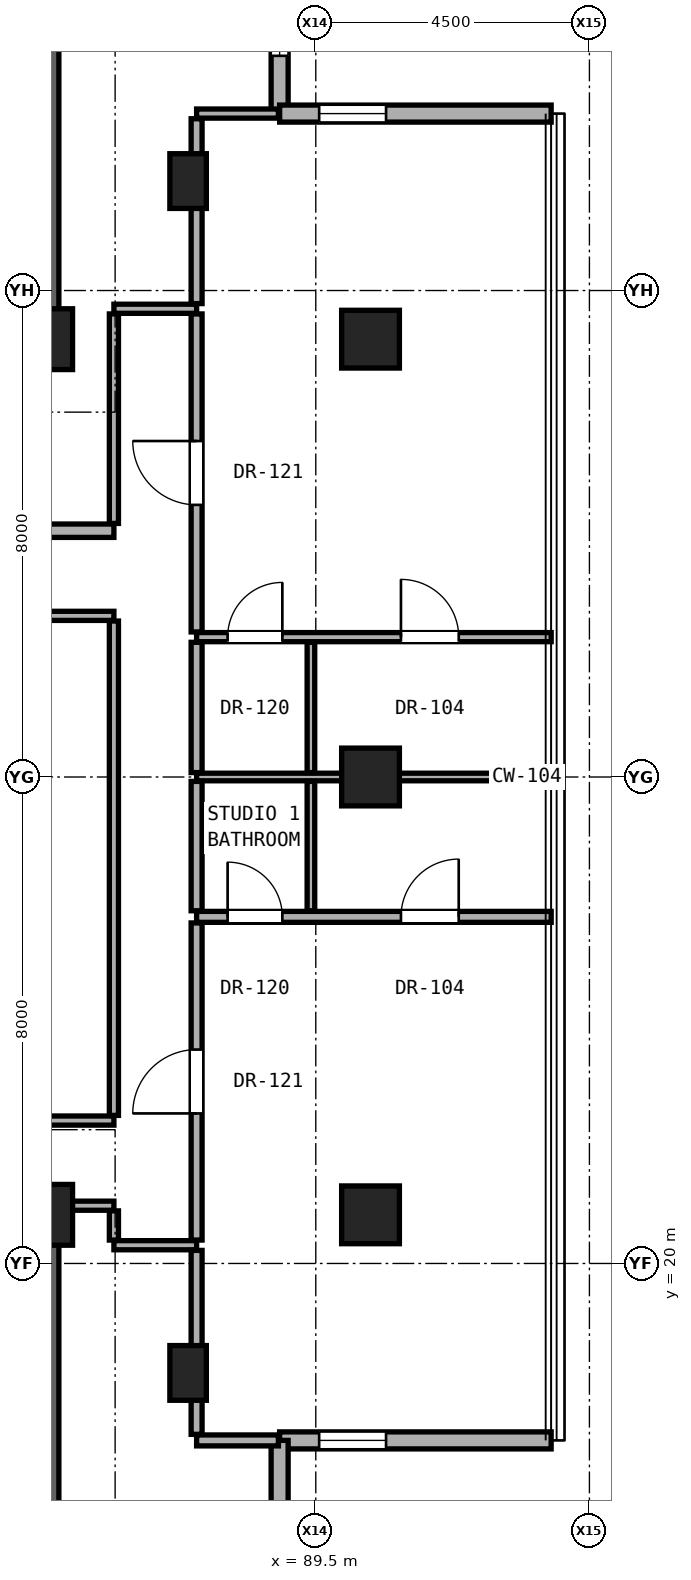
"""IFC4 building model, lengths in metres.
Left out: names, types, materials, properties, quantities, classifications, styles, units other than length and angle.
Written with IfcOpenShell. Run it as: python <this file> out.ifc"""

import sys

from ifc_helpers import new_model, si_unit, direction, frame, frame_2d, origin, origin_2d, place, context, subcontext, project, spatial, rectangle, hollow_rectangle, extrude, element, fill, save


model = new_model("IFC4")
c1 = context("Model", 3, precision=1e-05, world=origin(), true_north=direction((0.0, 1.0)))
c2 = subcontext(c1, "Body", "Model", "MODEL_VIEW")
j1 = project(units=[si_unit("LENGTHUNIT", "METRE"), si_unit("PLANEANGLEUNIT", "RADIAN")], contexts=[c1])
p1 = place(None, origin())
s1 = spatial("IfcSite", under=j1, at=p1, CompositionType="ELEMENT")
p2 = place(p1, origin())
s2 = spatial("IfcBuilding", under=s1, at=p2, CompositionType="ELEMENT")
p3 = place(p2, frame((0.0, 0.0, 157.65)))
s3 = spatial("IfcBuildingStorey", under=s2, at=p3, CompositionType="ELEMENT", Elevation=157.65)
for number, where, z_axis, x_axis in (
    (1, (85.0, 20.8, 0.0), (0.0, 0.0, 1.0), (1.0, 0.0, 0.0)),
    (2, (85.0, 35.2, 0.0), (0.0, 0.0, 1.0), (1.0, 0.0, 0.0)),
):
    element("IfcColumn", number, at=place(p3, frame(where, z_axis=z_axis, x_axis=x_axis)), inside=s3, PredefinedType="COLUMN", context=c2, shape_type="SweptSolid", body=[
        extrude(rectangle(XDim=1.0, YDim=1.0, at=origin_2d()), origin(), (0.0, 0.0, 1.0), 3.25),
    ])
for number, where, z_axis, x_axis in (
    (3, (90.4, 20.8, 0.0), (0.0, 0.0, 1.0), (1.0, 0.0, 0.0)),
    (4, (90.4, 28.0, 0.0), (0.0, 0.0, 1.0), (1.0, 0.0, 0.0)),
    (5, (90.4, 35.2, 0.0), (0.0, 0.0, 1.0), (1.0, 0.0, 0.0)),
):
    element("IfcColumn", number, at=place(p3, frame(where, z_axis=z_axis, x_axis=x_axis)), inside=s3, PredefinedType="COLUMN", context=c2, shape_type="SweptSolid", body=[
        extrude(hollow_rectangle(XDim=0.95, YDim=0.95, WallThickness=0.05, at=origin_2d()), origin(), (0.0, 0.0, 1.0), 3.25),
    ])
for number, where, z_axis, x_axis in (
    (6, (87.4, 18.2, 0.0), (0.0, 0.0, 1.0), (1.0, 0.0, 0.0)),
    (7, (87.4, 37.8, 0.0), (0.0, 0.0, 1.0), (1.0, 0.0, 0.0)),
):
    element("IfcColumn", number, at=place(p3, frame(where, z_axis=z_axis, x_axis=x_axis)), inside=s3, PredefinedType="PILASTER", context=c2, shape_type="SweptSolid", body=[
        extrude(rectangle(XDim=0.6, YDim=0.9, at=origin_2d()), origin(), (0.0, 0.0, 1.0), 3.25),
    ])
for number, where, z_axis, x_axis in (
    (8, (85.0, 35.2, 0.0), (0.0, 0.0, 1.0), (0.0, 1.0, 0.0)),
    (9, (85.0, 15.2, 0.0), (0.0, 0.0, 1.0), (0.0, 1.0, 0.0)),
):
    element("IfcWall", number, at=place(p3, frame(where, z_axis=z_axis, x_axis=x_axis)), inside=s3, PredefinedType="SHEAR", context=c2, shape_type="SweptSolid", body=[
        extrude(rectangle(XDim=5.6, YDim=0.55, at=frame_2d((2.8, 0.0))), origin(), (0.0, 0.0, 1.0), 3.05),
    ])
p4 = place(p3, frame((88.905, 38.91, 0.0), z_axis=(0.0, 0.0, 1.0), x_axis=(0.0, 1.0, 0.0)))
e10 = element("IfcWall", 10, at=p4, inside=s3, PredefinedType="SOLIDWALL", context=c2, shape_type="SweptSolid", body=[
    extrude(rectangle(XDim=4.465, YDim=0.28, at=frame_2d((2.232, 0.0))), origin(), (0.0, 0.0, 1.0), 3.03),
])
p5 = place(p4, frame((0.95, 0.0, 0.85)))
e11 = element("IfcOpeningElement", 11, at=p5, cuts=e10, PredefinedType="OPENING", context=c2, shape_type="SweptSolid", body=[
    extrude(rectangle(XDim=1.1, YDim=2.0, at=frame_2d((0.55, 1.0))), frame((0.0, 0.15, 0.0), z_axis=(0.0, -1.0, 0.0), x_axis=(1.0, 0.0, 0.0)), (0.0, 0.0, 1.0), 0.3),
])
p6 = place(p3, frame((88.905, 17.09, 0.0), z_axis=(0.0, 0.0, 1.0), x_axis=(1.0, 0.0, 0.0)))
e12 = element("IfcWall", 12, at=p6, inside=s3, PredefinedType="SOLIDWALL", context=c2, shape_type="SweptSolid", body=[
    extrude(rectangle(XDim=4.465, YDim=0.28, at=frame_2d((2.233, 0.0))), origin(), (0.0, 0.0, 1.0), 3.03),
])
p7 = place(p6, frame((0.65, 0.0, 0.85)))
e13 = element("IfcOpeningElement", 13, at=p7, cuts=e12, PredefinedType="OPENING", context=c2, shape_type="SweptSolid", body=[
    extrude(rectangle(XDim=1.1, YDim=2.0, at=frame_2d((0.55, 1.0))), frame((0.0, 0.15, 0.0), z_axis=(0.0, -1.0, 0.0), x_axis=(1.0, 0.0, 0.0)), (0.0, 0.0, 1.0), 0.3),
])
p8 = place(p3, frame((88.905, 12.625, 0.0), z_axis=(0.0, 0.0, 1.0), x_axis=(0.0, 1.0, 0.0)))
e14 = element("IfcWall", 14, at=p8, inside=s3, PredefinedType="SOLIDWALL", context=c2, shape_type="SweptSolid", body=[
    extrude(rectangle(XDim=4.465, YDim=0.28, at=frame_2d((2.232, 0.0))), origin(), (0.0, 0.0, 1.0), 3.03),
])
p9 = place(p3, frame((93.371, 38.91, 0.0), z_axis=(0.0, 0.0, 1.0), x_axis=(-1.0, 0.0, 0.0)))
e15 = element("IfcWall", 15, at=p9, inside=s3, PredefinedType="SOLIDWALL", context=c2, shape_type="SweptSolid", body=[
    extrude(rectangle(XDim=4.465, YDim=0.28, at=frame_2d((2.233, 0.0))), origin(), (0.0, 0.0, 1.0), 3.03),
])
p10 = place(p9, frame((2.715, 0.0, 0.85)))
e16 = element("IfcOpeningElement", 16, at=p10, cuts=e15, PredefinedType="OPENING", context=c2, shape_type="SweptSolid", body=[
    extrude(rectangle(XDim=1.1, YDim=2.0, at=frame_2d((0.55, 1.0))), frame((0.0, 0.15, 0.0), z_axis=(0.0, -1.0, 0.0), x_axis=(1.0, 0.0, 0.0)), (0.0, 0.0, 1.0), 0.3),
])
p11 = place(p3, frame((87.54, 17.09, 0.0), z_axis=(0.0, 0.0, 1.0), x_axis=(1.0, 0.0, 0.0)))
e17 = element("IfcWall", 17, at=p11, inside=s3, PredefinedType="PARTITIONING", context=c2, shape_type="SweptSolid", body=[
    extrude(rectangle(XDim=1.345, YDim=0.18, at=frame_2d((0.673, 0.0))), origin(), (0.0, 0.0, 1.0), 3.05),
])
p12 = place(p3, frame((86.18, 20.3, 0.0), z_axis=(0.0, 0.0, 1.0), x_axis=(1.0, 0.0, 0.0)))
e18 = element("IfcWall", 18, at=p12, inside=s3, PredefinedType="PARTITIONING", context=c2, shape_type="SweptSolid", body=[
    extrude(rectangle(XDim=1.36, YDim=0.15, at=frame_2d((0.68, 0.0))), origin(), (0.0, 0.0, 1.0), 3.05),
])
p13 = place(p3, frame((85.27, 20.95, 0.0), z_axis=(0.0, 0.0, 1.0), x_axis=(1.0, 0.0, 0.0)))
e19 = element("IfcWall", 19, at=p13, inside=s3, PredefinedType="PARTITIONING", context=c2, shape_type="SweptSolid", body=[
    extrude(rectangle(XDim=0.91, YDim=0.15, at=frame_2d((0.455, 0.0))), origin(), (0.0, 0.0, 1.0), 2.442),
])
p14 = place(p3, frame((66.68, 22.35, 0.0), z_axis=(0.0, 0.0, 1.0), x_axis=(1.0, 0.0, 0.0)))
e20 = element("IfcWall", 20, at=p14, inside=s3, PredefinedType="PARTITIONING", context=c2, shape_type="SweptSolid", body=[
    extrude(rectangle(XDim=19.5, YDim=0.15, at=frame_2d((9.75, 0.0))), origin(), (0.0, 0.0, 1.0), 2.186),
])
p15 = place(p14, frame((8.053, 0.0, 0.0)))
e21 = element("IfcOpeningElement", 21, at=p15, cuts=e20, PredefinedType="OPENING", context=c2, shape_type="SweptSolid", body=[
    extrude(rectangle(XDim=0.85, YDim=2.01, at=frame_2d((0.425, 1.005))), frame((0.0, 0.085, 0.0), z_axis=(0.0, -1.0, 0.0), x_axis=(1.0, 0.0, 0.0)), (0.0, 0.0, 1.0), 0.17),
])
p16 = place(p3, frame((87.54, 25.7, 0.0), z_axis=(0.0, 0.0, 1.0), x_axis=(1.0, 0.0, 0.0)))
e22 = element("IfcWall", 22, at=p16, inside=s3, PredefinedType="PARTITIONING", context=c2, shape_type="SweptSolid", body=[
    extrude(rectangle(XDim=5.831, YDim=0.18, at=frame_2d((2.916, 0.0))), origin(), (0.0, 0.0, 1.0), 2.269),
])
p17 = place(p16, frame((3.361, 0.0, 0.0)))
e23 = element("IfcOpeningElement", 23, at=p17, cuts=e22, PredefinedType="OPENING", context=c2, shape_type="SweptSolid", body=[
    extrude(rectangle(XDim=0.95, YDim=2.15, at=frame_2d((0.475, 1.075))), frame((0.0, 0.1, 0.0), z_axis=(0.0, -1.0, 0.0), x_axis=(1.0, 0.0, 0.0)), (0.0, 0.0, 1.0), 0.2),
])
p18 = place(p16, frame((0.51, 0.0, 0.0)))
e24 = element("IfcOpeningElement", 24, at=p18, cuts=e22, PredefinedType="OPENING", context=c2, shape_type="SweptSolid", body=[
    extrude(rectangle(XDim=0.9, YDim=2.1, at=frame_2d((0.45, 1.05))), frame((0.0, 0.1, 0.0), z_axis=(0.0, -1.0, 0.0), x_axis=(1.0, 0.0, 0.0)), (0.0, 0.0, 1.0), 0.2),
])
p19 = place(p3, frame((87.54, 28.0, 0.0), z_axis=(0.0, 0.0, 1.0), x_axis=(1.0, 0.0, 0.0)))
e25 = element("IfcWall", 25, at=p19, inside=s3, PredefinedType="PARTITIONING", context=c2, shape_type="SweptSolid", body=[
    extrude(rectangle(XDim=5.831, YDim=0.125, at=frame_2d((2.916, 0.0))), origin(), (0.0, 0.0, 1.0), 2.269),
])
p20 = place(p3, frame((87.54, 30.3, 0.0), z_axis=(0.0, 0.0, 1.0), x_axis=(1.0, 0.0, 0.0)))
e26 = element("IfcWall", 26, at=p20, inside=s3, PredefinedType="PARTITIONING", context=c2, shape_type="SweptSolid", body=[
    extrude(rectangle(XDim=5.831, YDim=0.15, at=frame_2d((2.916, 0.0))), origin(), (0.0, 0.0, 1.0), 2.269),
])
p21 = place(p20, frame((3.361, 0.0, 0.0)))
e27 = element("IfcOpeningElement", 27, at=p21, cuts=e26, PredefinedType="OPENING", context=c2, shape_type="SweptSolid", body=[
    extrude(rectangle(XDim=0.95, YDim=2.15, at=frame_2d((0.475, 1.075))), frame((0.0, 0.085, 0.0), z_axis=(0.0, -1.0, 0.0), x_axis=(1.0, 0.0, 0.0)), (0.0, 0.0, 1.0), 0.17),
])
p22 = place(p20, frame((0.51, 0.0, 0.0)))
e28 = element("IfcOpeningElement", 28, at=p22, cuts=e26, PredefinedType="OPENING", context=c2, shape_type="SweptSolid", body=[
    extrude(rectangle(XDim=0.9, YDim=2.1, at=frame_2d((0.45, 1.05))), frame((0.0, 0.085, 0.0), z_axis=(0.0, -1.0, 0.0), x_axis=(1.0, 0.0, 0.0)), (0.0, 0.0, 1.0), 0.17),
])
p23 = place(p3, frame((66.68, 30.65, 0.0), z_axis=(0.0, 0.0, 1.0), x_axis=(1.0, 0.0, 0.0)))
e29 = element("IfcWall", 29, at=p23, inside=s3, PredefinedType="PARTITIONING", context=c2, shape_type="SweptSolid", body=[
    extrude(rectangle(XDim=19.5, YDim=0.15, at=frame_2d((9.75, 0.0))), origin(), (0.0, 0.0, 1.0), 2.186),
])
p24 = place(p23, frame((3.745, 0.0, 0.0)))
e30 = element("IfcOpeningElement", 30, at=p24, cuts=e29, PredefinedType="OPENING", context=c2, shape_type="SweptSolid", body=[
    extrude(rectangle(XDim=0.95, YDim=2.15, at=frame_2d((0.475, 1.075))), frame((0.0, 0.085, 0.0), z_axis=(0.0, -1.0, 0.0), x_axis=(1.0, 0.0, 0.0)), (0.0, 0.0, 1.0), 0.17),
])
p25 = place(p23, frame((15.098, 0.0, 0.0)))
e31 = element("IfcOpeningElement", 31, at=p25, cuts=e29, PredefinedType="OPENING", context=c2, shape_type="SweptSolid", body=[
    extrude(rectangle(XDim=0.85, YDim=2.01, at=frame_2d((0.425, 1.005))), frame((0.0, 0.085, 0.0), z_axis=(0.0, -1.0, 0.0), x_axis=(1.0, 0.0, 0.0)), (0.0, 0.0, 1.0), 0.17),
])
p26 = place(p3, frame((71.55, 32.05, 0.0), z_axis=(0.0, 0.0, 1.0), x_axis=(1.0, 0.0, 0.0)))
e32 = element("IfcWall", 32, at=p26, inside=s3, PredefinedType="SOLIDWALL", context=c2, shape_type="SweptSolid", body=[
    extrude(rectangle(XDim=14.63, YDim=0.22, at=frame_2d((7.315, 0.0))), origin(), (0.0, 0.0, 1.0), 2.186),
])
p27 = place(p26, frame((6.065, 0.0, 0.0)))
e33 = element("IfcOpeningElement", 33, at=p27, cuts=e32, PredefinedType="OPENING", context=c2, shape_type="SweptSolid", body=[
    extrude(rectangle(XDim=0.85, YDim=2.01, at=frame_2d((0.425, 1.005))), frame((0.0, 0.12, 0.0), z_axis=(0.0, -1.0, 0.0), x_axis=(1.0, 0.0, 0.0)), (0.0, 0.0, 1.0), 0.24),
])
p28 = place(p26, frame((10.535, 0.0, 0.0)))
e34 = element("IfcOpeningElement", 34, at=p28, cuts=e32, PredefinedType="OPENING", context=c2, shape_type="SweptSolid", body=[
    extrude(rectangle(XDim=0.95, YDim=2.15, at=frame_2d((0.475, 1.075))), frame((0.0, 0.12, 0.0), z_axis=(0.0, -1.0, 0.0), x_axis=(1.0, 0.0, 0.0)), (0.0, 0.0, 1.0), 0.24),
])
p29 = place(p26, frame((0.7, 0.0, 0.0)))
e35 = element("IfcOpeningElement", 35, at=p29, cuts=e32, PredefinedType="OPENING", context=c2, shape_type="SweptSolid", body=[
    extrude(rectangle(XDim=0.85, YDim=2.01, at=frame_2d((0.425, 1.005))), frame((0.0, 0.12, 0.0), z_axis=(0.0, -1.0, 0.0), x_axis=(1.0, 0.0, 0.0)), (0.0, 0.0, 1.0), 0.24),
])
p30 = place(p26, frame((2.55, 0.0, 0.0)))
e36 = element("IfcOpeningElement", 36, at=p30, cuts=e32, PredefinedType="OPENING", context=c2, shape_type="SweptSolid", body=[
    extrude(rectangle(XDim=0.85, YDim=2.01, at=frame_2d((0.425, 1.005))), frame((0.0, 0.12, 0.0), z_axis=(0.0, -1.0, 0.0), x_axis=(1.0, 0.0, 0.0)), (0.0, 0.0, 1.0), 0.24),
])
p31 = place(p3, frame((86.18, 35.7, 0.0), z_axis=(0.0, 0.0, 1.0), x_axis=(1.0, 0.0, 0.0)))
e37 = element("IfcWall", 37, at=p31, inside=s3, PredefinedType="PARTITIONING", context=c2, shape_type="SweptSolid", body=[
    extrude(rectangle(XDim=1.36, YDim=0.15, at=frame_2d((0.68, 0.0))), origin(), (0.0, 0.0, 1.0), 3.05),
])
p32 = place(p3, frame((87.54, 38.91, 0.0), z_axis=(0.0, 0.0, 1.0), x_axis=(1.0, 0.0, 0.0)))
e38 = element("IfcWall", 38, at=p32, inside=s3, PredefinedType="PARTITIONING", context=c2, shape_type="SweptSolid", body=[
    extrude(rectangle(XDim=1.345, YDim=0.15, at=frame_2d((0.673, 0.0))), origin(), (0.0, 0.0, 1.0), 3.05),
])
p33 = place(p3, frame((86.18, 20.385, 0.0), z_axis=(0.0, 0.0, 1.0), x_axis=(0.0, 1.0, 0.0)))
e39 = element("IfcWall", 39, at=p33, inside=s3, PredefinedType="PARTITIONING", context=c2, shape_type="SweptSolid", body=[
    extrude(rectangle(XDim=0.48, YDim=0.15, at=frame_2d((0.24, 0.0))), origin(), (0.0, 0.0, 1.0), 2.442),
])
p34 = place(p3, frame((86.18, 22.435, 0.0), z_axis=(0.0, 0.0, 1.0), x_axis=(0.0, 1.0, 0.0)))
e40 = element("IfcWall", 40, at=p34, inside=s3, PredefinedType="PARTITIONING", context=c2, shape_type="SweptSolid", body=[
    extrude(rectangle(XDim=8.13, YDim=0.15, at=frame_2d((4.065, 0.0))), origin(), (0.0, 0.0, 1.0), 2.346),
])
p35 = place(p3, frame((86.18, 32.17, 0.0), z_axis=(0.0, 0.0, 1.0), x_axis=(0.0, 1.0, 0.0)))
e41 = element("IfcWall", 41, at=p35, inside=s3, PredefinedType="PARTITIONING", context=c2, shape_type="SweptSolid", body=[
    extrude(rectangle(XDim=3.445, YDim=0.15, at=frame_2d((1.723, 0.0))), origin(), (0.0, 0.0, 1.0), 2.442),
])
p36 = place(p3, frame((87.54, 17.19, 0.0), z_axis=(0.0, 0.0, 1.0), x_axis=(0.0, 1.0, 0.0)))
e42 = element("IfcWall", 42, at=p36, inside=s3, PredefinedType="PARTITIONING", context=c2, shape_type="SweptSolid", body=[
    extrude(rectangle(XDim=3.025, YDim=0.18, at=frame_2d((1.513, 0.0))), origin(), (0.0, 0.0, 1.0), 2.493),
])
p37 = place(p3, frame((87.54, 20.385, 0.0), z_axis=(0.0, 0.0, 1.0), x_axis=(0.0, 1.0, 0.0)))
e43 = element("IfcWall", 43, at=p37, inside=s3, PredefinedType="PARTITIONING", context=c2, shape_type="SweptSolid", body=[
    extrude(rectangle(XDim=5.215, YDim=0.18, at=frame_2d((2.607, 0.0))), origin(), (0.0, 0.0, 1.0), 2.442),
])
p38 = place(p37, frame((2.083, 0.0, 0.0)))
e44 = element("IfcOpeningElement", 44, at=p38, cuts=e43, PredefinedType="OPENING", context=c2, shape_type="SweptSolid", body=[
    extrude(rectangle(XDim=1.05, YDim=2.2, at=frame_2d((0.525, 1.1))), frame((0.0, 0.1, 0.0), z_axis=(0.0, -1.0, 0.0), x_axis=(1.0, 0.0, 0.0)), (0.0, 0.0, 1.0), 0.2),
])
p39 = place(p3, frame((87.54, 25.8, 0.0), z_axis=(0.0, 0.0, 1.0), x_axis=(0.0, 1.0, 0.0)))
e45 = element("IfcWall", 45, at=p39, inside=s3, PredefinedType="PARTITIONING", context=c2, shape_type="SweptSolid", body=[
    extrude(rectangle(XDim=2.127, YDim=0.18, at=frame_2d((1.064, 0.0))), origin(), (0.0, 0.0, 1.0), 2.346),
])
p40 = place(p3, frame((87.54, 28.073, 0.0), z_axis=(0.0, 0.0, 1.0), x_axis=(0.0, 1.0, 0.0)))
e46 = element("IfcWall", 46, at=p40, inside=s3, PredefinedType="PARTITIONING", context=c2, shape_type="SweptSolid", body=[
    extrude(rectangle(XDim=2.143, YDim=0.18, at=frame_2d((1.071, 0.0))), origin(), (0.0, 0.0, 1.0), 2.346),
])
p41 = place(p3, frame((87.54, 30.385, 0.0), z_axis=(0.0, 0.0, 1.0), x_axis=(0.0, 1.0, 0.0)))
e47 = element("IfcWall", 47, at=p41, inside=s3, PredefinedType="PARTITIONING", context=c2, shape_type="SweptSolid", body=[
    extrude(rectangle(XDim=5.23, YDim=0.18, at=frame_2d((2.615, 0.0))), origin(), (0.0, 0.0, 1.0), 2.442),
])
p42 = place(p41, frame((2.09, 0.0, 0.0)))
e48 = element("IfcOpeningElement", 48, at=p42, cuts=e47, PredefinedType="OPENING", context=c2, shape_type="SweptSolid", body=[
    extrude(rectangle(XDim=1.05, YDim=2.2, at=frame_2d((0.525, 1.1))), frame((0.0, 0.1, 0.0), z_axis=(0.0, -1.0, 0.0), x_axis=(1.0, 0.0, 0.0)), (0.0, 0.0, 1.0), 0.2),
])
p43 = place(p3, frame((87.54, 35.785, 0.0), z_axis=(0.0, 0.0, 1.0), x_axis=(0.0, 1.0, 0.0)))
e49 = element("IfcWall", 49, at=p43, inside=s3, PredefinedType="PARTITIONING", context=c2, shape_type="SweptSolid", body=[
    extrude(rectangle(XDim=3.04, YDim=0.18, at=frame_2d((1.52, 0.0))), origin(), (0.0, 0.0, 1.0), 2.493),
])
p44 = place(p3, frame((89.42, 25.8, 0.0), z_axis=(0.0, 0.0, 1.0), x_axis=(0.0, 1.0, 0.0)))
e50 = element("IfcWall", 50, at=p44, inside=s3, PredefinedType="PARTITIONING", context=c2, shape_type="SweptSolid", body=[
    extrude(rectangle(XDim=2.127, YDim=0.125, at=frame_2d((1.064, 0.0))), origin(), (0.0, 0.0, 1.0), 2.346),
])
p45 = place(p3, frame((89.42, 28.073, 0.0), z_axis=(0.0, 0.0, 1.0), x_axis=(0.0, 1.0, 0.0)))
e51 = element("IfcWall", 51, at=p45, inside=s3, PredefinedType="PARTITIONING", context=c2, shape_type="SweptSolid", body=[
    extrude(rectangle(XDim=2.143, YDim=0.125, at=frame_2d((1.071, 0.0))), origin(), (0.0, 0.0, 1.0), 2.346),
])
p46 = place(p5, origin())
e52 = element("IfcWindow", 52, at=p46, inside=s3, PartitioningType="SINGLE_PANEL", PredefinedType="WINDOW", context=c2, shape_type="SweptSolid", body=[
    extrude(rectangle(XDim=1.1, YDim=2.0, at=frame_2d((0.55, 1.0))), frame((0.0, 0.03, 0.0), z_axis=(0.0, -1.0, 0.0), x_axis=(1.0, 0.0, 0.0)), (0.0, 0.0, 1.0), 0.06),
])
fill(e11, e52)
p47 = place(p7, origin())
e53 = element("IfcWindow", 53, at=p47, inside=s3, PartitioningType="SINGLE_PANEL", PredefinedType="WINDOW", context=c2, shape_type="SweptSolid", body=[
    extrude(rectangle(XDim=1.1, YDim=2.0, at=frame_2d((0.55, 1.0))), frame((0.0, 0.03, 0.0), z_axis=(0.0, -1.0, 0.0), x_axis=(1.0, 0.0, 0.0)), (0.0, 0.0, 1.0), 0.06),
])
fill(e13, e53)
p48 = place(p10, origin())
e54 = element("IfcWindow", 54, at=p48, inside=s3, PartitioningType="SINGLE_PANEL", PredefinedType="WINDOW", context=c2, shape_type="SweptSolid", body=[
    extrude(rectangle(XDim=1.1, YDim=2.0, at=frame_2d((0.55, 1.0))), frame((0.0, 0.03, 0.0), z_axis=(0.0, -1.0, 0.0), x_axis=(1.0, 0.0, 0.0)), (0.0, 0.0, 1.0), 0.06),
])
fill(e16, e54)
p49 = place(p38, origin())
e55 = element("IfcDoor", 55, at=p49, inside=s3, OperationType="SINGLE_SWING_LEFT", PredefinedType="DOOR", context=c2, shape_type="SweptSolid", body=[
    extrude(rectangle(XDim=1.05, YDim=2.2, at=frame_2d((0.525, 1.1))), frame((0.0, 0.025, 0.0), z_axis=(0.0, -1.0, 0.0), x_axis=(1.0, 0.0, 0.0)), (0.0, 0.0, 1.0), 0.05),
])
fill(e44, e55)
p50 = place(p17, origin())
e56 = element("IfcDoor", 56, at=p50, inside=s3, OperationType="SINGLE_SWING_RIGHT", PredefinedType="DOOR", context=c2, shape_type="SweptSolid", body=[
    extrude(rectangle(XDim=0.95, YDim=2.15, at=frame_2d((0.475, 1.075))), frame((0.0, 0.025, 0.0), z_axis=(0.0, -1.0, 0.0), x_axis=(1.0, 0.0, 0.0)), (0.0, 0.0, 1.0), 0.05),
])
fill(e23, e56)
p51 = place(p18, origin())
e57 = element("IfcDoor", 57, at=p51, inside=s3, OperationType="SINGLE_SWING_LEFT", PredefinedType="DOOR", context=c2, shape_type="SweptSolid", body=[
    extrude(rectangle(XDim=0.9, YDim=2.1, at=frame_2d((0.45, 1.05))), frame((0.0, 0.025, 0.0), z_axis=(0.0, -1.0, 0.0), x_axis=(1.0, 0.0, 0.0)), (0.0, 0.0, 1.0), 0.05),
])
fill(e24, e57)
p52 = place(p42, origin())
e58 = element("IfcDoor", 58, at=p52, inside=s3, OperationType="SINGLE_SWING_RIGHT", PredefinedType="DOOR", context=c2, shape_type="SweptSolid", body=[
    extrude(rectangle(XDim=1.05, YDim=2.2, at=frame_2d((0.525, 1.1))), frame((0.0, 0.025, 0.0), z_axis=(0.0, -1.0, 0.0), x_axis=(1.0, 0.0, 0.0)), (0.0, 0.0, 1.0), 0.05),
])
fill(e48, e58)
p53 = place(p21, origin())
e59 = element("IfcDoor", 59, at=p53, inside=s3, OperationType="SINGLE_SWING_LEFT", PredefinedType="DOOR", context=c2, shape_type="SweptSolid", body=[
    extrude(rectangle(XDim=0.95, YDim=2.15, at=frame_2d((0.475, 1.075))), frame((0.0, 0.025, 0.0), z_axis=(0.0, -1.0, 0.0), x_axis=(1.0, 0.0, 0.0)), (0.0, 0.0, 1.0), 0.05),
])
fill(e27, e59)
p54 = place(p22, origin())
e60 = element("IfcDoor", 60, at=p54, inside=s3, OperationType="SINGLE_SWING_RIGHT", PredefinedType="DOOR", context=c2, shape_type="SweptSolid", body=[
    extrude(rectangle(XDim=0.9, YDim=2.1, at=frame_2d((0.45, 1.05))), frame((0.0, 0.025, 0.0), z_axis=(0.0, -1.0, 0.0), x_axis=(1.0, 0.0, 0.0)), (0.0, 0.0, 1.0), 0.05),
])
fill(e28, e60)
save(model, sys.argv[1])
